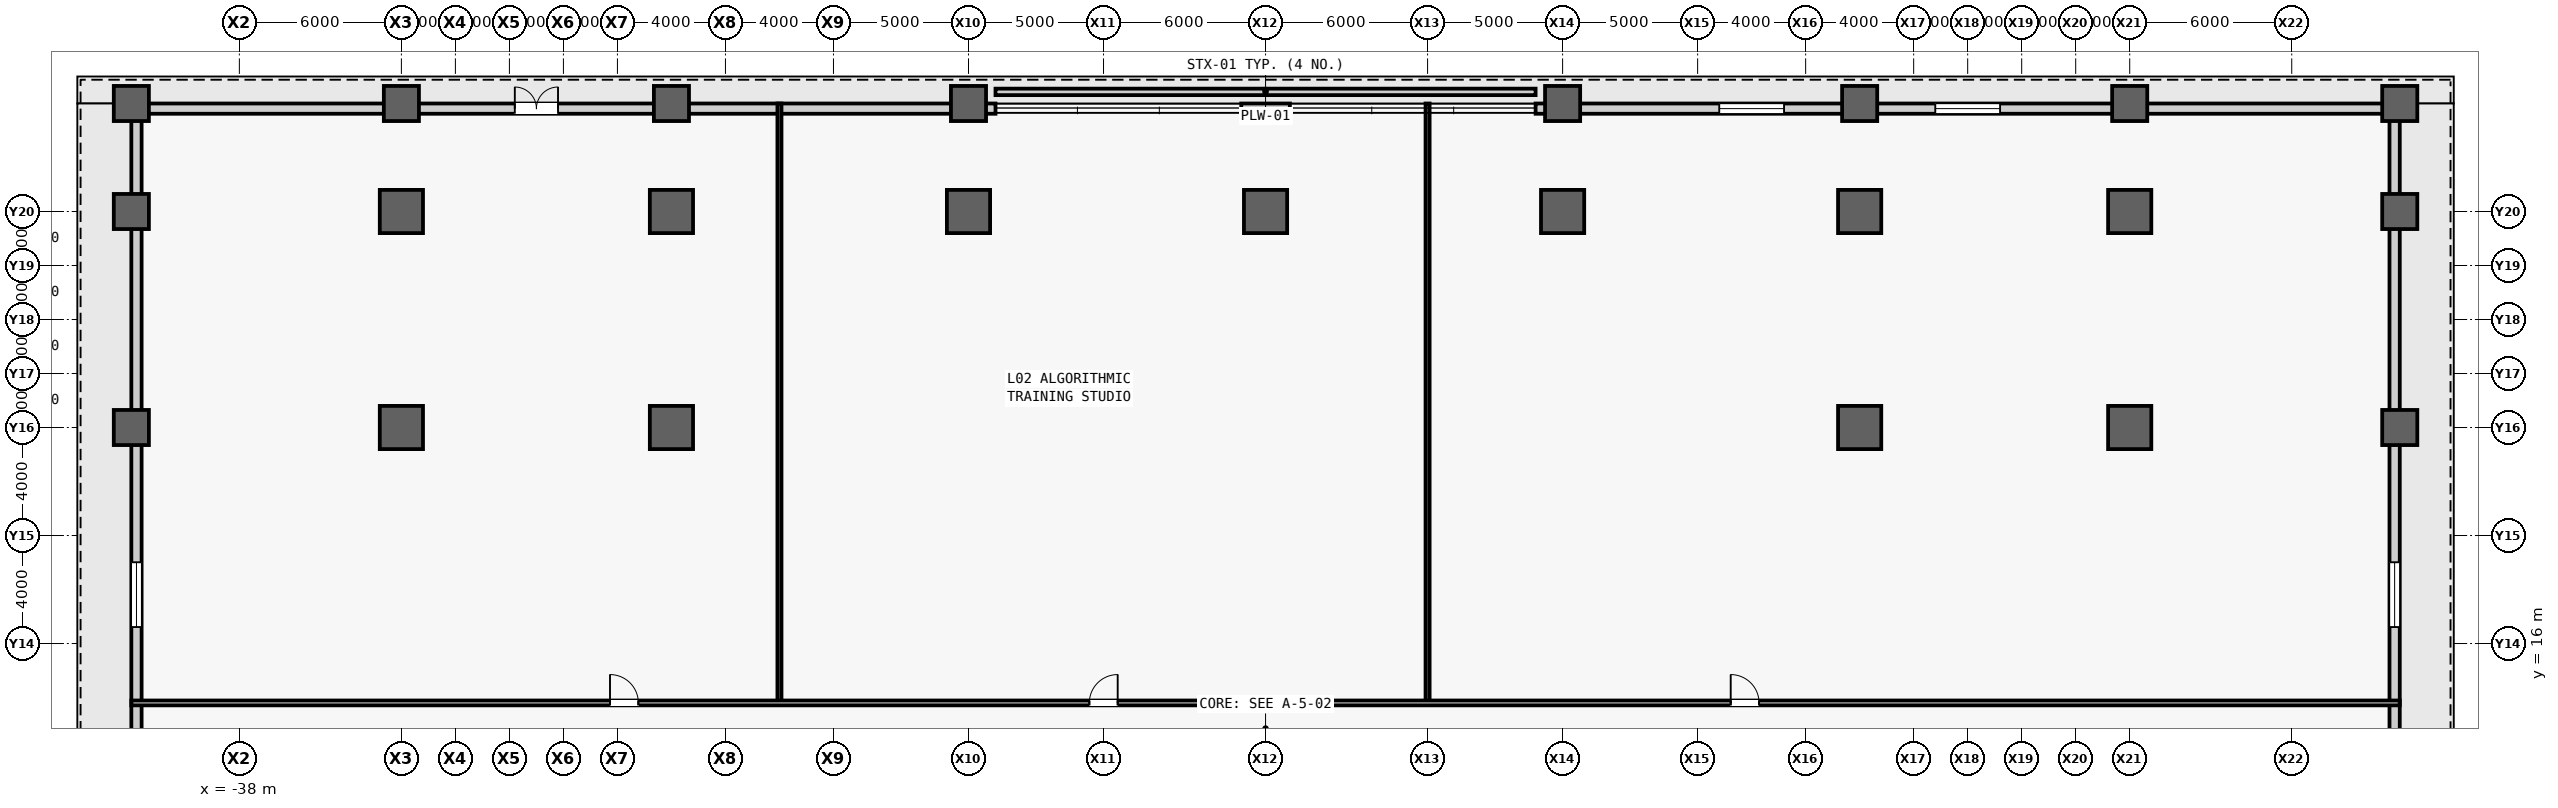
"""IFC4 building model, lengths in metres.
Left out: names, types, materials, properties, quantities, classifications, styles, units other than length and angle.
Written with IfcOpenShell. Run it as: python <this file> out.ifc"""

import sys

from ifc_helpers import new_model, si_unit, direction, frame, frame_2d, origin, origin_2d, place, context, subcontext, project, spatial, rectangle, extrude, source, transform, mapped, element, fill, save


model = new_model("IFC4")
c1 = context("Model", 3, precision=1e-05, world=origin(), true_north=direction((0.0, 1.0)))
c2 = subcontext(c1, "Body", "Model", "MODEL_VIEW")
j1 = project(units=[si_unit("LENGTHUNIT", "METRE"), si_unit("PLANEANGLEUNIT", "RADIAN")], contexts=[c1])
p1 = place(None, origin())
s1 = spatial("IfcSite", under=j1, at=p1, CompositionType="ELEMENT")
p2 = place(p1, origin())
s2 = spatial("IfcBuilding", under=s1, at=p2, CompositionType="ELEMENT")
p3 = place(p2, frame((0.0, 0.0, 12.0)))
s3 = spatial("IfcBuildingStorey", under=s2, at=p3, CompositionType="ELEMENT", Elevation=12.0)
m1 = source(origin(), c2, "Body", "SweptSolid", [
    extrude(rectangle(XDim=1.3, YDim=1.3, at=origin_2d()), origin(), (0.0, 0.0, 1.0), 5.4),
])
for number, where, z_axis, x_axis in (
    (1, (-42.0, 24.0, 0.0), (0.0, 0.0, 1.0), (1.0, 0.0, 0.0)),
    (2, (-42.0, 36.0, 0.0), (0.0, 0.0, 1.0), (1.0, 0.0, 0.0)),
):
    element("IfcColumn", number, at=place(p3, frame(where, z_axis=z_axis, x_axis=x_axis)), inside=s3, PredefinedType="COLUMN", context=c2, shape_type="MappedRepresentation", body=[
        mapped(m1, transform((0.0, 0.0, 0.0), scale=1.0)),
    ])
m2 = source(origin(), c2, "Body", "SweptSolid", [
    extrude(rectangle(XDim=1.6, YDim=1.6, at=origin_2d()), origin(), (0.0, 0.0, 1.0), 5.4),
])
for number, where, z_axis, x_axis in (
    (3, (-32.0, 24.0, 0.0), (0.0, 0.0, 1.0), (1.0, 0.0, 0.0)),
    (4, (-32.0, 32.0, 0.0), (0.0, 0.0, 1.0), (1.0, 0.0, 0.0)),
):
    element("IfcColumn", number, at=place(p3, frame(where, z_axis=z_axis, x_axis=x_axis)), inside=s3, PredefinedType="COLUMN", context=c2, shape_type="MappedRepresentation", body=[
        mapped(m2, transform((0.0, 0.0, 0.0), scale=1.0)),
    ])
p4 = place(p3, frame((-32.0, 36.0, 0.0), z_axis=(0.0, 0.0, 1.0), x_axis=(1.0, 0.0, 0.0)))
e5 = element("IfcColumn", 5, at=p4, inside=s3, PredefinedType="COLUMN", context=c2, shape_type="MappedRepresentation", body=[
    mapped(m1, transform((0.0, 0.0, 0.0), scale=1.0)),
])
for number, where, z_axis, x_axis in (
    (6, (-22.0, 24.0, 0.0), (0.0, 0.0, 1.0), (1.0, 0.0, 0.0)),
    (7, (-22.0, 32.0, 0.0), (0.0, 0.0, 1.0), (1.0, 0.0, 0.0)),
):
    element("IfcColumn", number, at=place(p3, frame(where, z_axis=z_axis, x_axis=x_axis)), inside=s3, PredefinedType="COLUMN", context=c2, shape_type="MappedRepresentation", body=[
        mapped(m2, transform((0.0, 0.0, 0.0), scale=1.0)),
    ])
p5 = place(p3, frame((-22.0, 36.0, 0.0), z_axis=(0.0, 0.0, 1.0), x_axis=(1.0, 0.0, 0.0)))
e8 = element("IfcColumn", 8, at=p5, inside=s3, PredefinedType="COLUMN", context=c2, shape_type="MappedRepresentation", body=[
    mapped(m1, transform((0.0, 0.0, 0.0), scale=1.0)),
])
p6 = place(p3, frame((-11.0, 32.0, 0.0), z_axis=(0.0, 0.0, 1.0), x_axis=(1.0, 0.0, 0.0)))
e9 = element("IfcColumn", 9, at=p6, inside=s3, PredefinedType="COLUMN", context=c2, shape_type="MappedRepresentation", body=[
    mapped(m2, transform((0.0, 0.0, 0.0), scale=1.0)),
])
p7 = place(p3, frame((-11.0, 36.0, 0.0), z_axis=(0.0, 0.0, 1.0), x_axis=(1.0, 0.0, 0.0)))
e10 = element("IfcColumn", 10, at=p7, inside=s3, PredefinedType="COLUMN", context=c2, shape_type="MappedRepresentation", body=[
    mapped(m1, transform((0.0, 0.0, 0.0), scale=1.0)),
])
for number, where, z_axis, x_axis in (
    (11, (0.0, 32.0, 0.0), (0.0, 0.0, 1.0), (1.0, 0.0, 0.0)),
    (12, (11.0, 32.0, 0.0), (0.0, 0.0, 1.0), (1.0, 0.0, 0.0)),
):
    element("IfcColumn", number, at=place(p3, frame(where, z_axis=z_axis, x_axis=x_axis)), inside=s3, PredefinedType="COLUMN", context=c2, shape_type="MappedRepresentation", body=[
        mapped(m2, transform((0.0, 0.0, 0.0), scale=1.0)),
    ])
p8 = place(p3, frame((11.0, 36.0, 0.0), z_axis=(0.0, 0.0, 1.0), x_axis=(1.0, 0.0, 0.0)))
e13 = element("IfcColumn", 13, at=p8, inside=s3, PredefinedType="COLUMN", context=c2, shape_type="MappedRepresentation", body=[
    mapped(m1, transform((0.0, 0.0, 0.0), scale=1.0)),
])
for number, where, z_axis, x_axis in (
    (14, (22.0, 24.0, 0.0), (0.0, 0.0, 1.0), (1.0, 0.0, 0.0)),
    (15, (22.0, 32.0, 0.0), (0.0, 0.0, 1.0), (1.0, 0.0, 0.0)),
):
    element("IfcColumn", number, at=place(p3, frame(where, z_axis=z_axis, x_axis=x_axis)), inside=s3, PredefinedType="COLUMN", context=c2, shape_type="MappedRepresentation", body=[
        mapped(m2, transform((0.0, 0.0, 0.0), scale=1.0)),
    ])
p9 = place(p3, frame((22.0, 36.0, 0.0), z_axis=(0.0, 0.0, 1.0), x_axis=(1.0, 0.0, 0.0)))
e16 = element("IfcColumn", 16, at=p9, inside=s3, PredefinedType="COLUMN", context=c2, shape_type="MappedRepresentation", body=[
    mapped(m1, transform((0.0, 0.0, 0.0), scale=1.0)),
])
for number, where, z_axis, x_axis in (
    (17, (32.0, 24.0, 0.0), (0.0, 0.0, 1.0), (1.0, 0.0, 0.0)),
    (18, (32.0, 32.0, 0.0), (0.0, 0.0, 1.0), (1.0, 0.0, 0.0)),
):
    element("IfcColumn", number, at=place(p3, frame(where, z_axis=z_axis, x_axis=x_axis)), inside=s3, PredefinedType="COLUMN", context=c2, shape_type="MappedRepresentation", body=[
        mapped(m2, transform((0.0, 0.0, 0.0), scale=1.0)),
    ])
for number, where, z_axis, x_axis in (
    (19, (32.0, 36.0, 0.0), (0.0, 0.0, 1.0), (1.0, 0.0, 0.0)),
    (20, (42.0, 24.0, 0.0), (0.0, 0.0, 1.0), (1.0, 0.0, 0.0)),
    (21, (42.0, 36.0, 0.0), (0.0, 0.0, 1.0), (1.0, 0.0, 0.0)),
    (22, (-42.0, 32.0, 0.0), (0.0, 0.0, 1.0), (1.0, 0.0, 0.0)),
    (23, (42.0, 32.0, 0.0), (0.0, 0.0, 1.0), (1.0, 0.0, 0.0)),
):
    element("IfcColumn", number, at=place(p3, frame(where, z_axis=z_axis, x_axis=x_axis)), inside=s3, PredefinedType="COLUMN", context=c2, shape_type="MappedRepresentation", body=[
        mapped(m1, transform((0.0, 0.0, 0.0), scale=1.0)),
    ])
m3 = source(origin(), c2, "Body", "SweptSolid", [
    extrude(rectangle(XDim=32.0, YDim=0.38, at=frame_2d((16.0, 0.0))), origin(), (0.0, 0.0, 1.0), 3.28),
])
p10 = place(p3, frame((-42.0, 35.81, 0.0), z_axis=(0.0, 0.0, 1.0), x_axis=(1.0, 0.0, 0.0)))
e24 = element("IfcWall", 24, at=p10, inside=s3, PredefinedType="STANDARD", context=c2, shape_type="MappedRepresentation", body=[
    mapped(m3, transform((0.0, 0.0, 0.0), scale=1.0)),
])
m4 = source(origin(), c2, "Body", "SweptSolid", [
    extrude(rectangle(XDim=1.6, YDim=2.25, at=frame_2d((0.8, 1.125))), frame((0.0, 0.2, 0.0), z_axis=(0.0, -1.0, 0.0), x_axis=(1.0, 0.0, 0.0)), (0.0, 0.0, 1.0), 0.4),
])
p11 = place(p10, frame((14.2, 0.0, 0.0)))
e25 = element("IfcOpeningElement", 25, at=p11, cuts=e24, PredefinedType="OPENING", context=c2, shape_type="MappedRepresentation", body=[
    mapped(m4, transform((0.0, 0.0, 0.0), scale=1.0)),
])
m5 = source(origin(), c2, "Body", "SweptSolid", [
    extrude(rectangle(XDim=1.8, YDim=0.38, at=frame_2d((0.9, 0.0))), origin(), (0.0, 0.0, 1.0), 3.28),
])
p12 = place(p3, frame((-0.9, 35.81, 0.0), z_axis=(0.0, 0.0, 1.0), x_axis=(1.0, 0.0, 0.0)))
e26 = element("IfcWall", 26, at=p12, inside=s3, PredefinedType="STANDARD", context=c2, shape_type="MappedRepresentation", body=[
    mapped(m5, transform((0.0, 0.0, 0.0), scale=1.0)),
])
p13 = place(p3, frame((10.0, 35.81, 0.0), z_axis=(0.0, 0.0, 1.0), x_axis=(1.0, 0.0, 0.0)))
e27 = element("IfcWall", 27, at=p13, inside=s3, PredefinedType="STANDARD", context=c2, shape_type="MappedRepresentation", body=[
    mapped(m3, transform((0.0, 0.0, 0.0), scale=1.0)),
])
m6 = source(origin(), c2, "Body", "SweptSolid", [
    extrude(rectangle(XDim=2.4, YDim=2.56, at=frame_2d((1.2, 1.28))), frame((0.0, 0.2, 0.0), z_axis=(0.0, -1.0, 0.0), x_axis=(1.0, 0.0, 0.0)), (0.0, 0.0, 1.0), 0.4),
])
p14 = place(p13, frame((6.8, 0.0, 0.5)))
e28 = element("IfcOpeningElement", 28, at=p14, cuts=e27, PredefinedType="OPENING", context=c2, shape_type="MappedRepresentation", body=[
    mapped(m6, transform((0.0, 0.0, 0.0), scale=1.0)),
])
p15 = place(p13, frame((14.8, 0.0, 0.5)))
e29 = element("IfcOpeningElement", 29, at=p15, cuts=e27, PredefinedType="OPENING", context=c2, shape_type="MappedRepresentation", body=[
    mapped(m6, transform((0.0, 0.0, 0.0), scale=1.0)),
])
m7 = source(origin(), c2, "Body", "SweptSolid", [
    extrude(rectangle(XDim=71.24, YDim=0.38, at=frame_2d((35.62, 0.0))), origin(), (0.0, 0.0, 1.0), 3.28),
])
p16 = place(p3, frame((-41.81, -35.62, 0.0), z_axis=(0.0, 0.0, 1.0), x_axis=(0.0, 1.0, 0.0)))
e30 = element("IfcWall", 30, at=p16, inside=s3, PredefinedType="STANDARD", context=c2, shape_type="MappedRepresentation", body=[
    mapped(m7, transform((0.0, 0.0, 0.0), scale=1.0)),
])
p17 = place(p16, frame((40.82, 0.0, 0.0)))
e31 = element("IfcOpeningElement", 31, at=p17, cuts=e30, PredefinedType="OPENING", context=c2, shape_type="MappedRepresentation", body=[
    mapped(m4, transform((0.0, 0.0, 0.0), scale=1.0)),
])
p18 = place(p16, frame((16.61, 0.0, 0.5)))
e32 = element("IfcOpeningElement", 32, at=p18, cuts=e30, PredefinedType="OPENING", context=c2, shape_type="MappedRepresentation", body=[
    mapped(m6, transform((0.0, 0.0, 0.0), scale=1.0)),
])
p19 = place(p16, frame((52.23, 0.0, 0.5)))
e33 = element("IfcOpeningElement", 33, at=p19, cuts=e30, PredefinedType="OPENING", context=c2, shape_type="MappedRepresentation", body=[
    mapped(m6, transform((0.0, 0.0, 0.0), scale=1.0)),
])
p20 = place(p3, frame((41.81, -35.62, 0.0), z_axis=(0.0, 0.0, 1.0), x_axis=(0.0, 1.0, 0.0)))
e34 = element("IfcWall", 34, at=p20, inside=s3, PredefinedType="STANDARD", context=c2, shape_type="MappedRepresentation", body=[
    mapped(m7, transform((0.0, 0.0, 0.0), scale=1.0)),
])
p21 = place(p20, frame((40.82, 0.0, 0.0)))
e35 = element("IfcOpeningElement", 35, at=p21, cuts=e34, PredefinedType="OPENING", context=c2, shape_type="MappedRepresentation", body=[
    mapped(m4, transform((0.0, 0.0, 0.0), scale=1.0)),
])
p22 = place(p20, frame((16.61, 0.0, 0.5)))
e36 = element("IfcOpeningElement", 36, at=p22, cuts=e34, PredefinedType="OPENING", context=c2, shape_type="MappedRepresentation", body=[
    mapped(m6, transform((0.0, 0.0, 0.0), scale=1.0)),
])
p23 = place(p20, frame((34.42, 0.0, 0.5)))
e37 = element("IfcOpeningElement", 37, at=p23, cuts=e34, PredefinedType="OPENING", context=c2, shape_type="MappedRepresentation", body=[
    mapped(m6, transform((0.0, 0.0, 0.0), scale=1.0)),
])
p24 = place(p20, frame((52.23, 0.0, 0.5)))
e38 = element("IfcOpeningElement", 38, at=p24, cuts=e34, PredefinedType="OPENING", context=c2, shape_type="MappedRepresentation", body=[
    mapped(m6, transform((0.0, 0.0, 0.0), scale=1.0)),
])
m8 = source(origin(), c2, "Body", "SweptSolid", [
    extrude(rectangle(XDim=20.0, YDim=0.24, at=frame_2d((10.0, 0.0))), origin(), (0.0, 0.0, 1.0), 0.65),
])
p25 = place(p3, frame((-10.0, 36.43, 0.0), z_axis=(0.0, 0.0, 1.0), x_axis=(1.0, 0.0, 0.0)))
e39 = element("IfcWall", 39, at=p25, inside=s3, PredefinedType="STANDARD", context=c2, shape_type="MappedRepresentation", body=[
    mapped(m8, transform((0.0, 0.0, 0.0), scale=1.0)),
])
m9 = source(origin(), c2, "Body", "SweptSolid", [
    extrude(rectangle(XDim=22.2, YDim=0.15, at=frame_2d((11.1, 0.0))), origin(), (0.0, 0.0, 1.0), 5.08),
])
for number, where, z_axis, x_axis in (
    (40, (-18.0, 13.8, 0.0), (0.0, 0.0, 1.0), (0.0, 1.0, 0.0)),
    (41, (6.0, 13.8, 0.0), (0.0, 0.0, 1.0), (0.0, 1.0, 0.0)),
):
    element("IfcWall", number, at=place(p3, frame(where, z_axis=z_axis, x_axis=x_axis)), inside=s3, PredefinedType="PARTITIONING", context=c2, shape_type="MappedRepresentation", body=[
        mapped(m9, transform((0.0, 0.0, 0.0), scale=1.0)),
    ])
m10 = source(origin(), c2, "Body", "SweptSolid", [
    extrude(rectangle(XDim=84.0, YDim=0.18, at=frame_2d((42.0, 0.0))), origin(), (0.0, 0.0, 1.0), 5.08),
])
p26 = place(p3, frame((-42.0, 13.8, 0.0), z_axis=(0.0, 0.0, 1.0), x_axis=(1.0, 0.0, 0.0)))
e42 = element("IfcWall", 42, at=p26, inside=s3, PredefinedType="PARTITIONING", context=c2, shape_type="MappedRepresentation", body=[
    mapped(m10, transform((0.0, 0.0, 0.0), scale=1.0)),
])
m11 = source(origin(), c2, "Body", "SweptSolid", [
    extrude(rectangle(XDim=1.05, YDim=2.2, at=frame_2d((0.525, 1.1))), frame((0.0, 0.1, 0.0), z_axis=(0.0, -1.0, 0.0), x_axis=(1.0, 0.0, 0.0)), (0.0, 0.0, 1.0), 0.2),
])
p27 = place(p26, frame((17.725, 0.0, 0.0)))
e43 = element("IfcOpeningElement", 43, at=p27, cuts=e42, PredefinedType="OPENING", context=c2, shape_type="MappedRepresentation", body=[
    mapped(m11, transform((0.0, 0.0, 0.0), scale=1.0)),
])
p28 = place(p26, frame((35.475, 0.0, 0.0)))
e44 = element("IfcOpeningElement", 44, at=p28, cuts=e42, PredefinedType="OPENING", context=c2, shape_type="MappedRepresentation", body=[
    mapped(m11, transform((0.0, 0.0, 0.0), scale=1.0)),
])
p29 = place(p26, frame((59.225, 0.0, 0.0)))
e45 = element("IfcOpeningElement", 45, at=p29, cuts=e42, PredefinedType="OPENING", context=c2, shape_type="MappedRepresentation", body=[
    mapped(m11, transform((0.0, 0.0, 0.0), scale=1.0)),
])
m12 = source(origin(), c2, "Body", "SweptSolid", [
    extrude(rectangle(XDim=1.6, YDim=2.25, at=frame_2d((0.8, 1.125))), frame((0.0, 0.025, 0.0), z_axis=(0.0, -1.0, 0.0), x_axis=(1.0, 0.0, 0.0)), (0.0, 0.0, 1.0), 0.05),
])
p30 = place(p11, origin())
e46 = element("IfcDoor", 46, at=p30, inside=s3, OperationType="DOUBLE_DOOR_SINGLE_SWING", PredefinedType="DOOR", context=c2, shape_type="MappedRepresentation", body=[
    mapped(m12, transform((0.0, 0.0, 0.0), scale=1.0)),
])
fill(e25, e46)
m13 = source(origin(), c2, "Body", "SweptSolid", [
    extrude(rectangle(XDim=2.4, YDim=2.56, at=frame_2d((1.2, 1.28))), frame((0.0, 0.03, 0.0), z_axis=(0.0, -1.0, 0.0), x_axis=(1.0, 0.0, 0.0)), (0.0, 0.0, 1.0), 0.06),
])
p31 = place(p14, origin())
e47 = element("IfcWindow", 47, at=p31, inside=s3, PartitioningType="SINGLE_PANEL", PredefinedType="WINDOW", context=c2, shape_type="MappedRepresentation", body=[
    mapped(m13, transform((0.0, 0.0, 0.0), scale=1.0)),
])
fill(e28, e47)
p32 = place(p15, origin())
e48 = element("IfcWindow", 48, at=p32, inside=s3, PartitioningType="SINGLE_PANEL", PredefinedType="WINDOW", context=c2, shape_type="MappedRepresentation", body=[
    mapped(m13, transform((0.0, 0.0, 0.0), scale=1.0)),
])
fill(e29, e48)
p33 = place(p19, origin())
e49 = element("IfcWindow", 49, at=p33, inside=s3, PartitioningType="SINGLE_PANEL", PredefinedType="WINDOW", context=c2, shape_type="MappedRepresentation", body=[
    mapped(m13, transform((0.0, 0.0, 0.0), scale=1.0)),
])
fill(e33, e49)
p34 = place(p24, origin())
e50 = element("IfcWindow", 50, at=p34, inside=s3, PartitioningType="SINGLE_PANEL", PredefinedType="WINDOW", context=c2, shape_type="MappedRepresentation", body=[
    mapped(m13, transform((0.0, 0.0, 0.0), scale=1.0)),
])
fill(e38, e50)
m14 = source(origin(), c2, "Body", "SweptSolid", [
    extrude(rectangle(XDim=1.05, YDim=2.2, at=frame_2d((0.525, 1.1))), frame((0.0, 0.025, 0.0), z_axis=(0.0, -1.0, 0.0), x_axis=(1.0, 0.0, 0.0)), (0.0, 0.0, 1.0), 0.05),
])
p35 = place(p27, origin())
e51 = element("IfcDoor", 51, at=p35, inside=s3, OperationType="SINGLE_SWING_LEFT", PredefinedType="DOOR", context=c2, shape_type="MappedRepresentation", body=[
    mapped(m14, transform((0.0, 0.0, 0.0), scale=1.0)),
])
fill(e43, e51)
p36 = place(p28, origin())
e52 = element("IfcDoor", 52, at=p36, inside=s3, OperationType="SINGLE_SWING_RIGHT", PredefinedType="DOOR", context=c2, shape_type="MappedRepresentation", body=[
    mapped(m14, transform((0.0, 0.0, 0.0), scale=1.0)),
])
fill(e44, e52)
p37 = place(p29, origin())
e53 = element("IfcDoor", 53, at=p37, inside=s3, OperationType="SINGLE_SWING_LEFT", PredefinedType="DOOR", context=c2, shape_type="MappedRepresentation", body=[
    mapped(m14, transform((0.0, 0.0, 0.0), scale=1.0)),
])
fill(e45, e53)
save(model, sys.argv[1])
